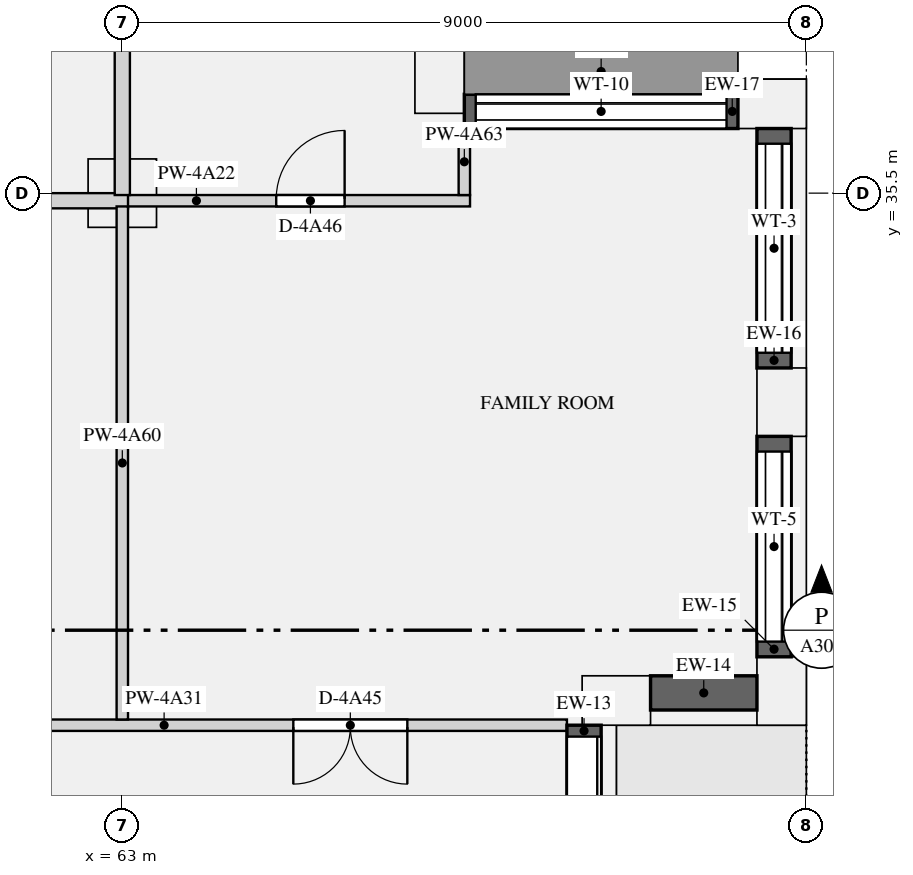
"""IFC4 building model, lengths in metres.
Left out: names, types, materials, properties, quantities, classifications, styles, units other than length and angle.
Written with IfcOpenShell. Run it as: python <this file> out.ifc"""

import sys

from ifc_helpers import new_model, si_unit, direction, frame, frame_2d, origin, origin_2d, place, context, subcontext, project, spatial, rectangle, extrude, element, fill, save


model = new_model("IFC4")
c1 = context("Model", 3, precision=1e-05, world=origin(), true_north=direction((0.0, 1.0)))
c2 = subcontext(c1, "Body", "Model", "MODEL_VIEW")
j1 = project(units=[si_unit("LENGTHUNIT", "METRE"), si_unit("PLANEANGLEUNIT", "RADIAN")], contexts=[c1])
p1 = place(None, origin())
s1 = spatial("IfcSite", under=j1, at=p1, CompositionType="ELEMENT")
p2 = place(p1, origin())
s2 = spatial("IfcBuilding", under=s1, at=p2, CompositionType="ELEMENT")
p3 = place(p2, frame((0.0, 0.0, 198.0)))
s3 = spatial("IfcBuildingStorey", under=s2, at=p3, CompositionType="ELEMENT", Elevation=198.0)
for number, where, z_axis, x_axis in (
    (1, (69.5, 28.825, 0.0), (0.0, 0.0, 1.0), (1.0, 0.0, 0.0)),
    (2, (71.675, 28.95, 0.0), (0.0, 0.0, 1.0), (0.0, 1.0, 0.0)),
    (3, (71.675, 32.75, 0.0), (0.0, 0.0, 1.0), (0.0, 1.0, 0.0)),
    (4, (71.55, 36.675, 0.0), (0.0, 0.0, 1.0), (-1.0, 0.0, 0.0)),
    (5, (67.175, 37.0, 0.0), (0.0, 0.0, 1.0), (0.0, 1.0, 0.0)),
):
    element("IfcColumn", number, at=place(p3, frame(where, z_axis=z_axis, x_axis=x_axis)), inside=s3, PredefinedType="USERDEFINED", context=c2, shape_type="SweptSolid", body=[
        extrude(rectangle(XDim=0.9, YDim=0.65, at=origin_2d()), origin(), (0.0, 0.0, 1.0), 3.15),
    ])
p4 = place(p3, frame((63.0, 35.5, 0.0), z_axis=(0.0, 0.0, 1.0), x_axis=(1.0, 0.0, 0.0)))
e6 = element("IfcColumn", 6, at=p4, inside=s3, PredefinedType="COLUMN", context=c2, shape_type="SweptSolid", body=[
    extrude(rectangle(XDim=0.9, YDim=0.9, at=origin_2d()), origin(), (0.0, 0.0, 1.0), 3.15),
])
p5 = place(p3, frame((69.075, 24.95, 0.0), z_axis=(0.0, 0.0, 1.0), x_axis=(0.0, 1.0, 0.0)))
e7 = element("IfcWall", 7, at=p5, inside=s3, PredefinedType="SOLIDWALL", context=c2, shape_type="SweptSolid", body=[
    extrude(rectangle(XDim=3.55, YDim=0.45, at=frame_2d((1.775, 0.0))), origin(), (0.0, 0.0, 1.0), 2.83),
])
p6 = place(p5, frame((0.15, 0.0, 0.0)))
e8 = element("IfcOpeningElement", 8, at=p6, cuts=e7, PredefinedType="OPENING", context=c2, shape_type="SweptSolid", body=[
    extrude(rectangle(XDim=3.25, YDim=2.3, at=frame_2d((1.625, 1.15))), frame((0.0, 0.235, 0.0), z_axis=(0.0, -1.0, 0.0), x_axis=(1.0, 0.0, 0.0)), (0.0, 0.0, 1.0), 0.47),
])
p7 = place(p3, frame((69.95, 28.925, 0.9), z_axis=(0.0, 0.0, 1.0), x_axis=(1.0, 0.0, 0.0)))
e9 = element("IfcWall", 9, at=p7, inside=s3, PredefinedType="SOLIDWALL", context=c2, shape_type="SweptSolid", body=[
    extrude(rectangle(XDim=1.4, YDim=0.45, at=frame_2d((0.7, 0.0))), origin(), (0.0, 0.0, 1.0), 1.93),
])
p8 = place(p3, frame((71.575, 29.4, 0.9), z_axis=(0.0, 0.0, 1.0), x_axis=(0.0, 1.0, 0.0)))
e10 = element("IfcWall", 10, at=p8, inside=s3, PredefinedType="SOLIDWALL", context=c2, shape_type="SweptSolid", body=[
    extrude(rectangle(XDim=2.9, YDim=0.45, at=frame_2d((1.45, 0.0))), origin(), (0.0, 0.0, 1.0), 1.93),
])
p9 = place(p8, frame((0.2, 0.0, 0.15)))
e11 = element("IfcOpeningElement", 11, at=p9, cuts=e10, PredefinedType="OPENING", context=c2, shape_type="SweptSolid", body=[
    extrude(rectangle(XDim=2.5, YDim=1.5, at=frame_2d((1.25, 0.75))), frame((0.0, 0.235, 0.0), z_axis=(0.0, -1.0, 0.0), x_axis=(1.0, 0.0, 0.0)), (0.0, 0.0, 1.0), 0.47),
])
p10 = place(p3, frame((71.575, 33.2, 0.9), z_axis=(0.0, 0.0, 1.0), x_axis=(0.0, 1.0, 0.0)))
e12 = element("IfcWall", 12, at=p10, inside=s3, PredefinedType="SOLIDWALL", context=c2, shape_type="SweptSolid", body=[
    extrude(rectangle(XDim=3.15, YDim=0.45, at=frame_2d((1.575, 0.0))), origin(), (0.0, 0.0, 1.0), 1.93),
])
p11 = place(p10, frame((0.2, 0.0, 0.15)))
e13 = element("IfcOpeningElement", 13, at=p11, cuts=e12, PredefinedType="OPENING", context=c2, shape_type="SweptSolid", body=[
    extrude(rectangle(XDim=2.75, YDim=1.5, at=frame_2d((1.375, 0.75))), frame((0.0, 0.235, 0.0), z_axis=(0.0, -1.0, 0.0), x_axis=(1.0, 0.0, 0.0)), (0.0, 0.0, 1.0), 0.47),
])
p12 = place(p3, frame((71.1, 36.575, 0.9), z_axis=(0.0, 0.0, 1.0), x_axis=(-1.0, 0.0, 0.0)))
e14 = element("IfcWall", 14, at=p12, inside=s3, PredefinedType="SOLIDWALL", context=c2, shape_type="SweptSolid", body=[
    extrude(rectangle(XDim=3.6, YDim=0.45, at=frame_2d((1.8, 0.0))), origin(), (0.0, 0.0, 1.0), 1.93),
])
p13 = place(p12, frame((0.15, 0.0, 0.15)))
e15 = element("IfcOpeningElement", 15, at=p13, cuts=e14, PredefinedType="OPENING", context=c2, shape_type="SweptSolid", body=[
    extrude(rectangle(XDim=3.3, YDim=1.5, at=frame_2d((1.65, 0.75))), frame((0.0, 0.235, 0.0), z_axis=(0.0, -1.0, 0.0), x_axis=(1.0, 0.0, 0.0)), (0.0, 0.0, 1.0), 0.47),
])
p14 = place(p3, frame((62.925, 35.4, 0.0), z_axis=(0.0, 0.0, 1.0), x_axis=(1.0, 0.0, 0.0)))
e16 = element("IfcWall", 16, at=p14, inside=s3, PredefinedType="PARTITIONING", context=c2, shape_type="SweptSolid", body=[
    extrude(rectangle(XDim=4.65, YDim=0.15, at=frame_2d((2.325, 0.0))), origin(), (0.0, 0.0, 1.0), 2.83),
])
p15 = place(p14, frame((2.1, 0.0, 0.0)))
e17 = element("IfcOpeningElement", 17, at=p15, cuts=e16, PredefinedType="OPENING", context=c2, shape_type="SweptSolid", body=[
    extrude(rectangle(XDim=0.9, YDim=2.1, at=frame_2d((0.45, 1.05))), frame((0.0, 0.085, 0.0), z_axis=(0.0, -1.0, 0.0), x_axis=(1.0, 0.0, 0.0)), (0.0, 0.0, 1.0), 0.17),
])
p16 = place(p3, frame((59.8, 35.4, 0.0), z_axis=(0.0, 0.0, 1.0), x_axis=(1.0, 0.0, 0.0)))
e18 = element("IfcWall", 18, at=p16, inside=s3, PredefinedType="PARTITIONING", context=c2, shape_type="SweptSolid", body=[
    extrude(rectangle(XDim=3.275, YDim=0.2, at=frame_2d((1.637, 0.0))), origin(), (0.0, 0.0, 1.0), 2.83),
])
p17 = place(p3, frame((59.8, 28.5, 0.0), z_axis=(0.0, 0.0, 1.0), x_axis=(1.0, 0.0, 0.0)))
e19 = element("IfcWall", 19, at=p17, inside=s3, PredefinedType="PARTITIONING", context=c2, shape_type="SweptSolid", body=[
    extrude(rectangle(XDim=9.05, YDim=0.15, at=frame_2d((4.525, 0.0))), origin(), (0.0, 0.0, 1.0), 2.83),
])
p18 = place(p17, frame((1.15, 0.0, 0.0)))
e20 = element("IfcOpeningElement", 20, at=p18, cuts=e19, PredefinedType="OPENING", context=c2, shape_type="SweptSolid", body=[
    extrude(rectangle(XDim=0.9, YDim=2.1, at=frame_2d((0.45, 1.05))), frame((0.0, 0.085, 0.0), z_axis=(0.0, -1.0, 0.0), x_axis=(1.0, 0.0, 0.0)), (0.0, 0.0, 1.0), 0.17),
])
p19 = place(p17, frame((5.45, 0.0, 0.0)))
e21 = element("IfcOpeningElement", 21, at=p19, cuts=e19, PredefinedType="OPENING", context=c2, shape_type="SweptSolid", body=[
    extrude(rectangle(XDim=1.5, YDim=2.1, at=frame_2d((0.75, 1.05))), frame((0.0, 0.085, 0.0), z_axis=(0.0, -1.0, 0.0), x_axis=(1.0, 0.0, 0.0)), (0.0, 0.0, 1.0), 0.17),
])
p20 = place(p3, frame((63.0, 28.575, 0.0), z_axis=(0.0, 0.0, 1.0), x_axis=(0.0, 1.0, 0.0)))
e22 = element("IfcWall", 22, at=p20, inside=s3, PredefinedType="PARTITIONING", context=c2, shape_type="SweptSolid", body=[
    extrude(rectangle(XDim=6.75, YDim=0.15, at=frame_2d((3.375, 0.0))), origin(), (0.0, 0.0, 1.0), 2.83),
])
p21 = place(p3, frame((63.0, 35.475, 0.0), z_axis=(0.0, 0.0, 1.0), x_axis=(0.0, 1.0, 0.0)))
e23 = element("IfcWall", 23, at=p21, inside=s3, PredefinedType="PARTITIONING", context=c2, shape_type="SweptSolid", body=[
    extrude(rectangle(XDim=5.375, YDim=0.2, at=frame_2d((2.688, 0.0))), origin(), (0.0, 0.0, 1.0), 2.83),
])
p22 = place(p3, frame((67.5, 35.475, 0.0), z_axis=(0.0, 0.0, 1.0), x_axis=(0.0, 1.0, 0.0)))
e24 = element("IfcWall", 24, at=p22, inside=s3, PredefinedType="PARTITIONING", context=c2, shape_type="SweptSolid", body=[
    extrude(rectangle(XDim=0.875, YDim=0.15, at=frame_2d((0.438, 0.0))), origin(), (0.0, 0.0, 1.0), 2.83),
])
p23 = place(p6, origin())
e25 = element("IfcDoor", 25, at=p23, inside=s3, OperationType="SLIDING_TO_LEFT", PredefinedType="DOOR", context=c2, shape_type="SweptSolid", body=[
    extrude(rectangle(XDim=3.25, YDim=2.3, at=frame_2d((1.625, 1.15))), frame((0.0, -0.07, 0.0), z_axis=(0.0, -1.0, 0.0), x_axis=(1.0, 0.0, 0.0)), (0.0, 0.0, 1.0), 0.05),
])
fill(e8, e25)
p24 = place(p9, origin())
e26 = element("IfcWindow", 26, at=p24, inside=s3, PartitioningType="SINGLE_PANEL", PredefinedType="WINDOW", context=c2, shape_type="SweptSolid", body=[
    extrude(rectangle(XDim=2.5, YDim=1.5, at=frame_2d((1.25, 0.75))), frame((0.0, -0.065, 0.0), z_axis=(0.0, -1.0, 0.0), x_axis=(1.0, 0.0, 0.0)), (0.0, 0.0, 1.0), 0.06),
])
fill(e11, e26)
p25 = place(p11, origin())
e27 = element("IfcWindow", 27, at=p25, inside=s3, PartitioningType="SINGLE_PANEL", PredefinedType="WINDOW", context=c2, shape_type="SweptSolid", body=[
    extrude(rectangle(XDim=2.75, YDim=1.5, at=frame_2d((1.375, 0.75))), frame((0.0, -0.065, 0.0), z_axis=(0.0, -1.0, 0.0), x_axis=(1.0, 0.0, 0.0)), (0.0, 0.0, 1.0), 0.06),
])
fill(e13, e27)
p26 = place(p13, origin())
e28 = element("IfcWindow", 28, at=p26, inside=s3, PartitioningType="SINGLE_PANEL", PredefinedType="WINDOW", context=c2, shape_type="SweptSolid", body=[
    extrude(rectangle(XDim=3.3, YDim=1.5, at=frame_2d((1.65, 0.75))), frame((0.0, -0.065, 0.0), z_axis=(0.0, -1.0, 0.0), x_axis=(1.0, 0.0, 0.0)), (0.0, 0.0, 1.0), 0.06),
])
fill(e15, e28)
p27 = place(p19, frame((1.5, 0.0, 0.0), z_axis=(0.0, 0.0, 1.0), x_axis=(-1.0, 0.0, 0.0)))
e29 = element("IfcDoor", 29, at=p27, inside=s3, OperationType="DOUBLE_DOOR_SINGLE_SWING", PredefinedType="DOOR", context=c2, shape_type="SweptSolid", body=[
    extrude(rectangle(XDim=1.5, YDim=2.1, at=frame_2d((0.75, 1.05))), frame((0.0, 0.025, 0.0), z_axis=(0.0, -1.0, 0.0), x_axis=(1.0, 0.0, 0.0)), (0.0, 0.0, 1.0), 0.05),
])
fill(e21, e29)
p28 = place(p15, origin())
e30 = element("IfcDoor", 30, at=p28, inside=s3, OperationType="SINGLE_SWING_RIGHT", PredefinedType="DOOR", context=c2, shape_type="SweptSolid", body=[
    extrude(rectangle(XDim=0.9, YDim=2.1, at=frame_2d((0.45, 1.05))), frame((0.0, 0.025, 0.0), z_axis=(0.0, -1.0, 0.0), x_axis=(1.0, 0.0, 0.0)), (0.0, 0.0, 1.0), 0.05),
])
fill(e17, e30)
save(model, sys.argv[1])
